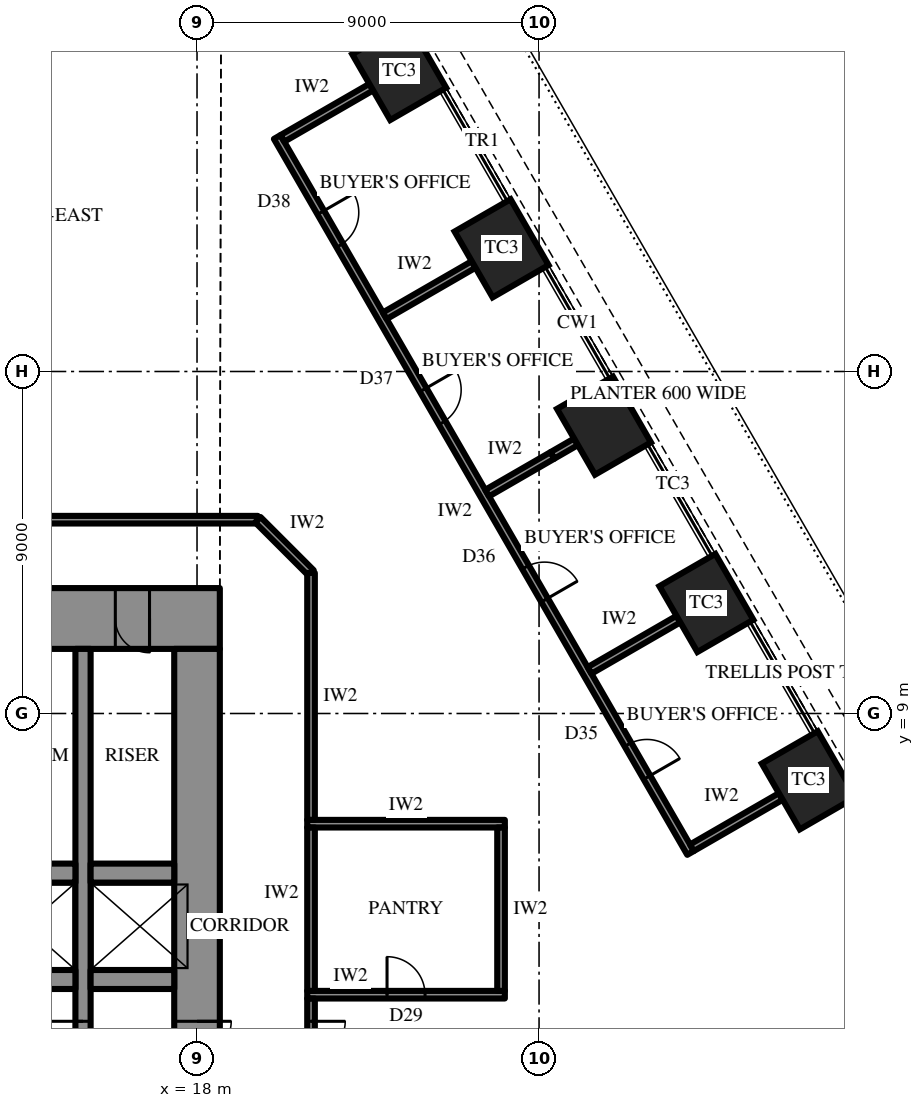
"""IFC4 building model, lengths in metres.
Left out: names, types, materials, properties, quantities, classifications, styles, units other than length and angle.
Written with IfcOpenShell. Run it as: python <this file> out.ifc"""

import sys

from ifc_helpers import new_model, si_unit, direction, frame, frame_2d, origin, origin_2d, place, context, subcontext, project, spatial, rectangle, extrude, element, fill, save


model = new_model("IFC4")
c1 = context("Model", 3, precision=1e-05, world=origin(), true_north=direction((0.0, 1.0)))
c2 = subcontext(c1, "Body", "Model", "MODEL_VIEW")
j1 = project(units=[si_unit("LENGTHUNIT", "METRE"), si_unit("PLANEANGLEUNIT", "RADIAN")], contexts=[c1])
p1 = place(None, origin())
s1 = spatial("IfcSite", under=j1, at=p1, CompositionType="ELEMENT")
p2 = place(p1, origin())
s2 = spatial("IfcBuilding", under=s1, at=p2, CompositionType="ELEMENT")
p3 = place(p2, frame((0.0, 0.0, 69.7)))
s3 = spatial("IfcBuildingStorey", under=s2, at=p3, CompositionType="ELEMENT", Elevation=69.7)
for number, where, z_axis, x_axis in (
    (1, (34.097, 7.242, 0.0), (0.0, 0.0, 1.0), (-0.5, 0.866, 0.0)),
    (2, (31.403, 11.908, 0.0), (0.0, 0.0, 1.0), (-0.5, 0.866, 0.0)),
    (3, (28.709, 16.575, 0.0), (0.0, 0.0, 1.0), (-0.5, 0.866, 0.0)),
    (4, (26.014, 21.242, 0.0), (0.0, 0.0, 1.0), (-0.5, 0.866, 0.0)),
    (5, (23.32, 25.908, 0.0), (0.0, 0.0, 1.0), (-0.5, 0.866, 0.0)),
):
    element("IfcColumn", number, at=place(p3, frame(where, z_axis=z_axis, x_axis=x_axis)), inside=s3, PredefinedType="COLUMN", context=c2, shape_type="SweptSolid", body=[
        extrude(rectangle(XDim=2.0, YDim=1.7, at=origin_2d()), origin(), (0.0, 0.0, 1.0), 4.2),
    ])
p4 = place(p3, frame((-18.6, 11.5, 0.0), z_axis=(0.0, 0.0, 1.0), x_axis=(1.0, 0.0, 0.0)))
e6 = element("IfcWall", 6, at=p4, inside=s3, PredefinedType="SHEAR", context=c2, shape_type="SweptSolid", body=[
    extrude(rectangle(XDim=37.2, YDim=1.6, at=frame_2d((18.6, 0.0))), origin(), (0.0, 0.0, 1.0), 4.2),
])
p5 = place(p4, frame((19.45, 0.0, 0.0)))
e7 = element("IfcOpeningElement", 7, at=p5, cuts=e6, PredefinedType="OPENING", context=c2, shape_type="SweptSolid", body=[
    extrude(rectangle(XDim=0.9, YDim=2.2, at=frame_2d((0.45, 1.1))), frame((0.0, 0.81, 0.0), z_axis=(0.0, -1.0, 0.0), x_axis=(1.0, 0.0, 0.0)), (0.0, 0.0, 1.0), 1.62),
])
p6 = place(p4, frame((22.45, 0.0, 0.0)))
e8 = element("IfcOpeningElement", 8, at=p6, cuts=e6, PredefinedType="OPENING", context=c2, shape_type="SweptSolid", body=[
    extrude(rectangle(XDim=0.9, YDim=2.2, at=frame_2d((0.45, 1.1))), frame((0.0, 0.81, 0.0), z_axis=(0.0, -1.0, 0.0), x_axis=(1.0, 0.0, 0.0)), (0.0, 0.0, 1.0), 1.62),
])
p7 = place(p4, frame((25.5, 0.0, 0.0)))
e9 = element("IfcOpeningElement", 9, at=p7, cuts=e6, PredefinedType="OPENING", context=c2, shape_type="SweptSolid", body=[
    extrude(rectangle(XDim=1.0, YDim=2.2, at=frame_2d((0.5, 1.1))), frame((0.0, 0.81, 0.0), z_axis=(0.0, -1.0, 0.0), x_axis=(1.0, 0.0, 0.0)), (0.0, 0.0, 1.0), 1.62),
])
p8 = place(p4, frame((1.85, 0.0, 0.0)))
e10 = element("IfcOpeningElement", 10, at=p8, cuts=e6, PredefinedType="OPENING", context=c2, shape_type="SweptSolid", body=[
    extrude(rectangle(XDim=0.9, YDim=2.2, at=frame_2d((0.45, 1.1))), frame((0.0, 0.81, 0.0), z_axis=(0.0, -1.0, 0.0), x_axis=(1.0, 0.0, 0.0)), (0.0, 0.0, 1.0), 1.62),
])
p9 = place(p4, frame((4.6, 0.0, 0.0)))
e11 = element("IfcOpeningElement", 11, at=p9, cuts=e6, PredefinedType="OPENING", context=c2, shape_type="SweptSolid", body=[
    extrude(rectangle(XDim=0.9, YDim=2.2, at=frame_2d((0.45, 1.1))), frame((0.0, 0.81, 0.0), z_axis=(0.0, -1.0, 0.0), x_axis=(1.0, 0.0, 0.0)), (0.0, 0.0, 1.0), 1.62),
])
p10 = place(p4, frame((7.75, 0.0, 0.0)))
e12 = element("IfcOpeningElement", 12, at=p10, cuts=e6, PredefinedType="OPENING", context=c2, shape_type="SweptSolid", body=[
    extrude(rectangle(XDim=0.9, YDim=2.2, at=frame_2d((0.45, 1.1))), frame((0.0, 0.81, 0.0), z_axis=(0.0, -1.0, 0.0), x_axis=(1.0, 0.0, 0.0)), (0.0, 0.0, 1.0), 1.62),
])
p11 = place(p4, frame((28.55, 0.0, 0.0)))
e13 = element("IfcOpeningElement", 13, at=p11, cuts=e6, PredefinedType="OPENING", context=c2, shape_type="SweptSolid", body=[
    extrude(rectangle(XDim=0.9, YDim=2.2, at=frame_2d((0.45, 1.1))), frame((0.0, 0.81, 0.0), z_axis=(0.0, -1.0, 0.0), x_axis=(1.0, 0.0, 0.0)), (0.0, 0.0, 1.0), 1.62),
])
p12 = place(p4, frame((31.7, 0.0, 0.0)))
e14 = element("IfcOpeningElement", 14, at=p12, cuts=e6, PredefinedType="OPENING", context=c2, shape_type="SweptSolid", body=[
    extrude(rectangle(XDim=0.9, YDim=2.2, at=frame_2d((0.45, 1.1))), frame((0.0, 0.81, 0.0), z_axis=(0.0, -1.0, 0.0), x_axis=(1.0, 0.0, 0.0)), (0.0, 0.0, 1.0), 1.62),
])
p13 = place(p4, frame((34.45, 0.0, 0.0)))
e15 = element("IfcOpeningElement", 15, at=p13, cuts=e6, PredefinedType="OPENING", context=c2, shape_type="SweptSolid", body=[
    extrude(rectangle(XDim=0.9, YDim=2.2, at=frame_2d((0.45, 1.1))), frame((0.0, 0.81, 0.0), z_axis=(0.0, -1.0, 0.0), x_axis=(1.0, 0.0, 0.0)), (0.0, 0.0, 1.0), 1.62),
])
p14 = place(p3, frame((18.0, -10.7, 0.0), z_axis=(0.0, 0.0, 1.0), x_axis=(0.0, 1.0, 0.0)))
e16 = element("IfcWall", 16, at=p14, inside=s3, PredefinedType="SHEAR", context=c2, shape_type="SweptSolid", body=[
    extrude(rectangle(XDim=21.4, YDim=1.2, at=frame_2d((10.7, 0.0))), origin(), (0.0, 0.0, 1.0), 4.2),
])
p15 = place(p14, frame((9.8, 0.0, 0.0)))
e17 = element("IfcOpeningElement", 17, at=p15, cuts=e16, PredefinedType="OPENING", context=c2, shape_type="SweptSolid", body=[
    extrude(rectangle(XDim=1.8, YDim=2.4, at=frame_2d((0.9, 1.2))), frame((0.0, 0.61, 0.0), z_axis=(0.0, -1.0, 0.0), x_axis=(1.0, 0.0, 0.0)), (0.0, 0.0, 1.0), 1.22),
])
p16 = place(p3, frame((15.0, -10.7, 0.0), z_axis=(0.0, 0.0, 1.0), x_axis=(0.0, 1.0, 0.0)))
e18 = element("IfcWall", 18, at=p16, inside=s3, PredefinedType="SHEAR", context=c2, shape_type="SweptSolid", body=[
    extrude(rectangle(XDim=21.4, YDim=0.4, at=frame_2d((10.7, 0.0))), origin(), (0.0, 0.0, 1.0), 4.2),
])
p17 = place(p16, frame((9.8, 0.0, 0.0)))
e19 = element("IfcOpeningElement", 19, at=p17, cuts=e18, PredefinedType="OPENING", context=c2, shape_type="SweptSolid", body=[
    extrude(rectangle(XDim=1.8, YDim=2.4, at=frame_2d((0.9, 1.2))), frame((0.0, 0.21, 0.0), z_axis=(0.0, -1.0, 0.0), x_axis=(1.0, 0.0, 0.0)), (0.0, 0.0, 1.0), 0.42),
])
p18 = place(p3, frame((12.3, 2.0, 0.0), z_axis=(0.0, 0.0, 1.0), x_axis=(1.0, 0.0, 0.0)))
e20 = element("IfcWall", 20, at=p18, inside=s3, PredefinedType="SHEAR", context=c2, shape_type="SweptSolid", body=[
    extrude(rectangle(XDim=2.5, YDim=0.5, at=frame_2d((1.25, 0.0))), origin(), (0.0, 0.0, 1.0), 4.2),
])
p19 = place(p3, frame((15.2, 2.0, 0.0), z_axis=(0.0, 0.0, 1.0), x_axis=(1.0, 0.0, 0.0)))
e21 = element("IfcWall", 21, at=p19, inside=s3, PredefinedType="SHEAR", context=c2, shape_type="SweptSolid", body=[
    extrude(rectangle(XDim=2.2, YDim=0.5, at=frame_2d((1.1, 0.0))), origin(), (0.0, 0.0, 1.0), 4.2),
])
p20 = place(p3, frame((12.3, 4.8, 0.0), z_axis=(0.0, 0.0, 1.0), x_axis=(1.0, 0.0, 0.0)))
e22 = element("IfcWall", 22, at=p20, inside=s3, PredefinedType="SHEAR", context=c2, shape_type="SweptSolid", body=[
    extrude(rectangle(XDim=2.5, YDim=0.5, at=frame_2d((1.25, 0.0))), origin(), (0.0, 0.0, 1.0), 4.2),
])
p21 = place(p3, frame((15.2, 4.8, 0.0), z_axis=(0.0, 0.0, 1.0), x_axis=(1.0, 0.0, 0.0)))
e23 = element("IfcWall", 23, at=p21, inside=s3, PredefinedType="SHEAR", context=c2, shape_type="SweptSolid", body=[
    extrude(rectangle(XDim=2.2, YDim=0.5, at=frame_2d((1.1, 0.0))), origin(), (0.0, 0.0, 1.0), 4.2),
])
p22 = place(p3, frame((30.986, 5.33, 0.0), z_axis=(0.0, 0.0, 1.0), x_axis=(-0.500000289772, 0.866025236485, 0.0)))
e24 = element("IfcWall", 24, at=p22, inside=s3, PredefinedType="PARTITIONING", context=c2, shape_type="SweptSolid", body=[
    extrude(rectangle(XDim=21.754, YDim=0.2, at=frame_2d((10.877, 0.0))), origin(), (0.0, 0.0, 1.0), 4.0),
])
p23 = place(p22, frame((2.294, 0.0, 0.0)))
e25 = element("IfcOpeningElement", 25, at=p23, cuts=e24, PredefinedType="OPENING", context=c2, shape_type="SweptSolid", body=[
    extrude(rectangle(XDim=1.0, YDim=2.2, at=frame_2d((0.5, 1.1))), frame((0.0, 0.11, 0.0), z_axis=(0.0, -1.0, 0.0), x_axis=(1.0, 0.0, 0.0)), (0.0, 0.0, 1.0), 0.22),
])
p24 = place(p22, frame((7.683, 0.0, 0.0)))
e26 = element("IfcOpeningElement", 26, at=p24, cuts=e24, PredefinedType="OPENING", context=c2, shape_type="SweptSolid", body=[
    extrude(rectangle(XDim=1.0, YDim=2.2, at=frame_2d((0.5, 1.1))), frame((0.0, 0.11, 0.0), z_axis=(0.0, -1.0, 0.0), x_axis=(1.0, 0.0, 0.0)), (0.0, 0.0, 1.0), 0.22),
])
p25 = place(p22, frame((13.072, 0.0, 0.0)))
e27 = element("IfcOpeningElement", 27, at=p25, cuts=e24, PredefinedType="OPENING", context=c2, shape_type="SweptSolid", body=[
    extrude(rectangle(XDim=1.0, YDim=2.2, at=frame_2d((0.5, 1.1))), frame((0.0, 0.11, 0.0), z_axis=(0.0, -1.0, 0.0), x_axis=(1.0, 0.0, 0.0)), (0.0, 0.0, 1.0), 0.22),
])
p26 = place(p22, frame((18.46, 0.0, 0.0)))
e28 = element("IfcOpeningElement", 28, at=p26, cuts=e24, PredefinedType="OPENING", context=c2, shape_type="SweptSolid", body=[
    extrude(rectangle(XDim=1.0, YDim=2.2, at=frame_2d((0.5, 1.1))), frame((0.0, 0.11, 0.0), z_axis=(0.0, -1.0, 0.0), x_axis=(1.0, 0.0, 0.0)), (0.0, 0.0, 1.0), 0.22),
])
for number, where, z_axis, x_axis in (
    (29, (31.023, 5.467, 0.0), (0.0, 0.0, 1.0), (0.866, 0.5, 0.0)),
    (30, (28.329, 10.133, 0.0), (0.0, 0.0, 1.0), (0.866, 0.5, 0.0)),
):
    element("IfcWall", number, at=place(p3, frame(where, z_axis=z_axis, x_axis=x_axis)), inside=s3, PredefinedType="PARTITIONING", context=c2, shape_type="SweptSolid", body=[
        extrude(rectangle(XDim=2.7, YDim=0.2, at=frame_2d((1.35, 0.0))), origin(), (0.0, 0.0, 1.0), 2.944),
    ])
p27 = place(p3, frame((25.634, 14.8, 0.0), z_axis=(0.0, 0.0, 1.0), x_axis=(0.866038008192, 0.49997816789, 0.0)))
e31 = element("IfcWall", 31, at=p27, inside=s3, PredefinedType="PARTITIONING", context=c2, shape_type="SweptSolid", body=[
    extrude(rectangle(XDim=1.983, YDim=0.2, at=frame_2d((0.992, 0.0))), origin(), (0.0, 0.0, 1.0), 4.0),
])
p28 = place(p3, frame((27.352, 15.792, 0.0), z_axis=(0.0, 0.0, 1.0), x_axis=(0.866117509073, 0.499840435016, 0.0)))
e32 = element("IfcWall", 32, at=p28, inside=s3, PredefinedType="PARTITIONING", context=c2, shape_type="SweptSolid", body=[
    extrude(rectangle(XDim=0.717, YDim=0.2, at=frame_2d((0.358, 0.0))), origin(), (0.0, 0.0, 1.0), 2.992),
])
p29 = place(p3, frame((22.94, 19.467, 0.0), z_axis=(0.0, 0.0, 1.0), x_axis=(0.866019956843, 0.50000943426, 0.0)))
e33 = element("IfcWall", 33, at=p29, inside=s3, PredefinedType="PARTITIONING", context=c2, shape_type="SweptSolid", body=[
    extrude(rectangle(XDim=2.7, YDim=0.2, at=frame_2d((1.35, 0.0))), origin(), (0.0, 0.0, 1.0), 2.992),
])
p30 = place(p3, frame((20.246, 24.133, 0.0), z_axis=(0.0, 0.0, 1.0), x_axis=(0.86599734893, 0.500048589285, 0.0)))
e34 = element("IfcWall", 34, at=p30, inside=s3, PredefinedType="PARTITIONING", context=c2, shape_type="SweptSolid", body=[
    extrude(rectangle(XDim=2.7, YDim=0.2, at=frame_2d((1.35, 0.0))), origin(), (0.0, 0.0, 1.0), 2.992),
])
p31 = place(p3, frame((20.9, 1.6, 0.0), z_axis=(0.0, 0.0, 1.0), x_axis=(1.0, 0.0, 0.0)))
e35 = element("IfcWall", 35, at=p31, inside=s3, PredefinedType="PARTITIONING", context=c2, shape_type="SweptSolid", body=[
    extrude(rectangle(XDim=5.2, YDim=0.2, at=frame_2d((2.6, 0.0))), origin(), (0.0, 0.0, 1.0), 4.0),
])
p32 = place(p31, frame((2.1, 0.0, 0.0)))
e36 = element("IfcOpeningElement", 36, at=p32, cuts=e35, PredefinedType="OPENING", context=c2, shape_type="SweptSolid", body=[
    extrude(rectangle(XDim=1.0, YDim=2.2, at=frame_2d((0.5, 1.1))), frame((0.0, 0.11, 0.0), z_axis=(0.0, -1.0, 0.0), x_axis=(1.0, 0.0, 0.0)), (0.0, 0.0, 1.0), 0.22),
])
p33 = place(p3, frame((20.9, 6.1, 0.0), z_axis=(0.0, 0.0, 1.0), x_axis=(1.0, 0.0, 0.0)))
e37 = element("IfcWall", 37, at=p33, inside=s3, PredefinedType="PARTITIONING", context=c2, shape_type="SweptSolid", body=[
    extrude(rectangle(XDim=5.2, YDim=0.2, at=frame_2d((2.6, 0.0))), origin(), (0.0, 0.0, 1.0), 4.0),
])
for number, where, z_axis, x_axis in (
    (38, (21.0, 1.7, 0.0), (0.0, 0.0, 1.0), (0.0, 1.0, 0.0)),
    (39, (26.0, 1.7, 0.0), (0.0, 0.0, 1.0), (0.0, 1.0, 0.0)),
):
    element("IfcWall", number, at=place(p3, frame(where, z_axis=z_axis, x_axis=x_axis)), inside=s3, PredefinedType="PARTITIONING", context=c2, shape_type="SweptSolid", body=[
        extrude(rectangle(XDim=4.3, YDim=0.2, at=frame_2d((2.15, 0.0))), origin(), (0.0, 0.0, 1.0), 4.0),
    ])
p34 = place(p3, frame((-19.6, 14.1, 0.0), z_axis=(0.0, 0.0, 1.0), x_axis=(1.0, 0.0, 0.0)))
e40 = element("IfcWall", 40, at=p34, inside=s3, PredefinedType="PARTITIONING", context=c2, shape_type="SweptSolid", body=[
    extrude(rectangle(XDim=39.2, YDim=0.2, at=frame_2d((19.6, 0.0))), origin(), (0.0, 0.0, 1.0), 4.0),
])
p35 = place(p34, frame((19.1, 0.0, 0.0)))
e41 = element("IfcOpeningElement", 41, at=p35, cuts=e40, PredefinedType="OPENING", context=c2, shape_type="SweptSolid", body=[
    extrude(rectangle(XDim=1.0, YDim=2.2, at=frame_2d((0.5, 1.1))), frame((0.0, 0.11, 0.0), z_axis=(0.0, -1.0, 0.0), x_axis=(1.0, 0.0, 0.0)), (0.0, 0.0, 1.0), 0.22),
])
p36 = place(p3, frame((19.6, 14.1, 0.0), z_axis=(0.0, 0.0, 1.0), x_axis=(0.707045124756, -0.707168432242, 0.0)))
e42 = element("IfcWall", 42, at=p36, inside=s3, PredefinedType="PARTITIONING", context=c2, shape_type="SweptSolid", body=[
    extrude(rectangle(XDim=1.98, YDim=0.2, at=frame_2d((0.99, 0.0))), origin(), (0.0, 0.0, 1.0), 4.0),
])
p37 = place(p3, frame((21.0, 1.499, 0.0), z_axis=(0.0, 0.0, 1.0), x_axis=(0.0, -1.0, 0.0)))
e43 = element("IfcWall", 43, at=p37, inside=s3, PredefinedType="PARTITIONING", context=c2, shape_type="SweptSolid", body=[
    extrude(rectangle(XDim=2.998, YDim=0.2, at=frame_2d((1.499, 0.0))), origin(), (0.0, 0.0, 1.0), 4.0),
])
p38 = place(p37, frame((0.599, 0.0, 0.0)))
e44 = element("IfcOpeningElement", 44, at=p38, cuts=e43, PredefinedType="OPENING", context=c2, shape_type="SweptSolid", body=[
    extrude(rectangle(XDim=1.8, YDim=2.4, at=frame_2d((0.9, 1.2))), frame((0.0, 0.11, 0.0), z_axis=(0.0, -1.0, 0.0), x_axis=(1.0, 0.0, 0.0)), (0.0, 0.0, 1.0), 0.22),
])
p39 = place(p3, frame((21.0, 12.7, 0.0), z_axis=(0.0, 0.0, 1.0), x_axis=(0.0, -1.0, 0.0)))
e45 = element("IfcWall", 45, at=p39, inside=s3, PredefinedType="PARTITIONING", context=c2, shape_type="SweptSolid", body=[
    extrude(rectangle(XDim=6.499, YDim=0.2, at=frame_2d((3.25, 0.0))), origin(), (0.0, 0.0, 1.0), 4.0),
])
p40 = place(p15, frame((1.8, 0.0, 0.0), z_axis=(0.0, 0.0, 1.0), x_axis=(-1.0, 0.0, 0.0)))
e46 = element("IfcDoor", 46, at=p40, inside=s3, OperationType="DOUBLE_DOOR_SINGLE_SWING", PredefinedType="DOOR", context=c2, shape_type="SweptSolid", body=[
    extrude(rectangle(XDim=1.8, YDim=2.4, at=frame_2d((0.9, 1.2))), frame((0.0, 0.025, 0.0), z_axis=(0.0, -1.0, 0.0), x_axis=(1.0, 0.0, 0.0)), (0.0, 0.0, 1.0), 0.05),
])
fill(e17, e46)
p41 = place(p13, frame((0.9, 0.0, 0.0), z_axis=(0.0, 0.0, 1.0), x_axis=(-1.0, 0.0, 0.0)))
e47 = element("IfcDoor", 47, at=p41, inside=s3, OperationType="SINGLE_SWING_RIGHT", PredefinedType="DOOR", context=c2, shape_type="SweptSolid", body=[
    extrude(rectangle(XDim=0.9, YDim=2.2, at=frame_2d((0.45, 1.1))), frame((0.0, 0.025, 0.0), z_axis=(0.0, -1.0, 0.0), x_axis=(1.0, 0.0, 0.0)), (0.0, 0.0, 1.0), 0.05),
])
fill(e15, e47)
p42 = place(p17, origin())
e48 = element("IfcDoor", 48, at=p42, inside=s3, OperationType="DOUBLE_DOOR_SINGLE_SWING", PredefinedType="DOOR", context=c2, shape_type="SweptSolid", body=[
    extrude(rectangle(XDim=1.8, YDim=2.4, at=frame_2d((0.9, 1.2))), frame((0.0, 0.025, 0.0), z_axis=(0.0, -1.0, 0.0), x_axis=(1.0, 0.0, 0.0)), (0.0, 0.0, 1.0), 0.05),
])
fill(e19, e48)
p43 = place(p23, frame((1.0, 0.0, 0.0), z_axis=(0.0, 0.0, 1.0), x_axis=(-1.0, 0.0, 0.0)))
e49 = element("IfcDoor", 49, at=p43, inside=s3, OperationType="SINGLE_SWING_LEFT", PredefinedType="DOOR", context=c2, shape_type="SweptSolid", body=[
    extrude(rectangle(XDim=1.0, YDim=2.2, at=frame_2d((0.5, 1.1))), frame((0.0, 0.025, 0.0), z_axis=(0.0, -1.0, 0.0), x_axis=(1.0, 0.0, 0.0)), (0.0, 0.0, 1.0), 0.05),
])
fill(e25, e49)
p44 = place(p24, frame((1.0, 0.0, 0.0), z_axis=(0.0, 0.0, 1.0), x_axis=(-1.0, 0.0, 0.0)))
e50 = element("IfcDoor", 50, at=p44, inside=s3, OperationType="SINGLE_SWING_LEFT", PredefinedType="DOOR", context=c2, shape_type="SweptSolid", body=[
    extrude(rectangle(XDim=1.0, YDim=2.2, at=frame_2d((0.5, 1.1))), frame((0.0, 0.025, 0.0), z_axis=(0.0, -1.0, 0.0), x_axis=(1.0, 0.0, 0.0)), (0.0, 0.0, 1.0), 0.05),
])
fill(e26, e50)
p45 = place(p25, frame((1.0, 0.0, 0.0), z_axis=(0.0, 0.0, 1.0), x_axis=(-1.0, 0.0, 0.0)))
e51 = element("IfcDoor", 51, at=p45, inside=s3, OperationType="SINGLE_SWING_RIGHT", PredefinedType="DOOR", context=c2, shape_type="SweptSolid", body=[
    extrude(rectangle(XDim=1.0, YDim=2.2, at=frame_2d((0.5, 1.1))), frame((0.0, 0.025, 0.0), z_axis=(0.0, -1.0, 0.0), x_axis=(1.0, 0.0, 0.0)), (0.0, 0.0, 1.0), 0.05),
])
fill(e27, e51)
p46 = place(p26, frame((1.0, 0.0, 0.0), z_axis=(0.0, 0.0, 1.0), x_axis=(-1.0, 0.0, 0.0)))
e52 = element("IfcDoor", 52, at=p46, inside=s3, OperationType="SINGLE_SWING_RIGHT", PredefinedType="DOOR", context=c2, shape_type="SweptSolid", body=[
    extrude(rectangle(XDim=1.0, YDim=2.2, at=frame_2d((0.5, 1.1))), frame((0.0, 0.025, 0.0), z_axis=(0.0, -1.0, 0.0), x_axis=(1.0, 0.0, 0.0)), (0.0, 0.0, 1.0), 0.05),
])
fill(e28, e52)
p47 = place(p32, origin())
e53 = element("IfcDoor", 53, at=p47, inside=s3, OperationType="SINGLE_SWING_RIGHT", PredefinedType="DOOR", context=c2, shape_type="SweptSolid", body=[
    extrude(rectangle(XDim=1.0, YDim=2.2, at=frame_2d((0.5, 1.1))), frame((0.0, 0.025, 0.0), z_axis=(0.0, -1.0, 0.0), x_axis=(1.0, 0.0, 0.0)), (0.0, 0.0, 1.0), 0.05),
])
fill(e36, e53)
p48 = place(p38, origin())
e54 = element("IfcDoor", 54, at=p48, inside=s3, OperationType="DOUBLE_DOOR_SINGLE_SWING", PredefinedType="DOOR", context=c2, shape_type="SweptSolid", body=[
    extrude(rectangle(XDim=1.8, YDim=2.4, at=frame_2d((0.9, 1.2))), frame((0.0, 0.025, 0.0), z_axis=(0.0, -1.0, 0.0), x_axis=(1.0, 0.0, 0.0)), (0.0, 0.0, 1.0), 0.05),
])
fill(e44, e54)
save(model, sys.argv[1])
